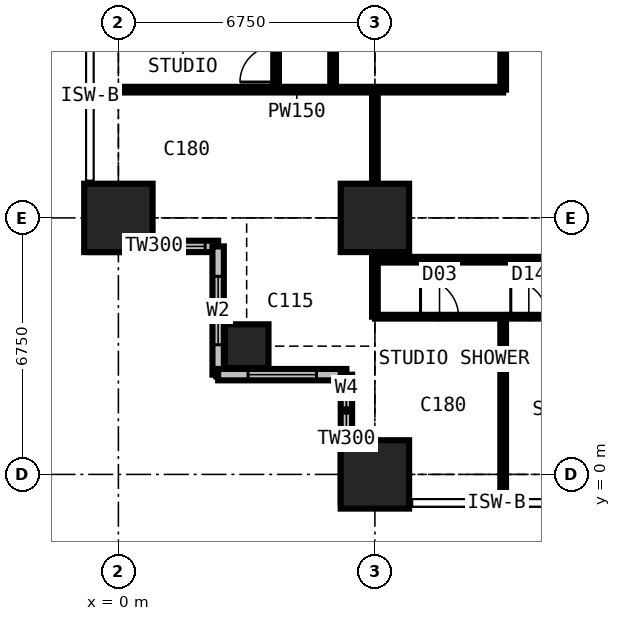
"""IFC4 building model, lengths in metres.
Left out: names, types, materials, properties, quantities, classifications, styles, units other than length and angle.
Written with IfcOpenShell. Run it as: python <this file> out.ifc"""

import sys

from ifc_helpers import new_model, si_unit, direction, frame, frame_2d, origin, origin_2d, place, context, subcontext, project, spatial, rectangle, extrude, element, fill, save


model = new_model("IFC4")
c1 = context("Model", 3, precision=1e-05, world=origin(), true_north=direction((0.0, 1.0)))
c2 = subcontext(c1, "Body", "Model", "MODEL_VIEW")
j1 = project(units=[si_unit("LENGTHUNIT", "METRE"), si_unit("PLANEANGLEUNIT", "RADIAN")], contexts=[c1])
p1 = place(None, origin())
s1 = spatial("IfcSite", under=j1, at=p1, CompositionType="ELEMENT")
p2 = place(p1, origin())
s2 = spatial("IfcBuilding", under=s1, at=p2, CompositionType="ELEMENT")
p3 = place(p2, frame((0.0, 0.0, 80.1)))
s3 = spatial("IfcBuildingStorey", under=s2, at=p3, CompositionType="ELEMENT", Elevation=80.1)
p4 = place(p3, frame((0.0, 6.75, 0.0), z_axis=(0.0, 0.0, 1.0), x_axis=(1.0, 0.0, 0.0)))
e1 = element("IfcColumn", 1, at=p4, inside=s3, PredefinedType="COLUMN", context=c2, shape_type="SweptSolid", body=[
    extrude(rectangle(XDim=1.8, YDim=1.8, at=origin_2d()), origin(), (0.0, 0.0, 1.0), 3.6),
])
p5 = place(p3, frame((3.375, 3.375, 0.0), z_axis=(0.0, 0.0, 1.0), x_axis=(1.0, 0.0, 0.0)))
e2 = element("IfcColumn", 2, at=p5, inside=s3, PredefinedType="COLUMN", context=c2, shape_type="SweptSolid", body=[
    extrude(rectangle(XDim=1.15, YDim=1.15, at=origin_2d()), origin(), (0.0, 0.0, 1.0), 3.6),
])
for number, where, z_axis, x_axis in (
    (3, (6.75, 0.0, 0.0), (0.0, 0.0, 1.0), (1.0, 0.0, 0.0)),
    (4, (6.75, 6.75, 0.0), (0.0, 0.0, 1.0), (1.0, 0.0, 0.0)),
):
    element("IfcColumn", number, at=place(p3, frame(where, z_axis=z_axis, x_axis=x_axis)), inside=s3, PredefinedType="COLUMN", context=c2, shape_type="SweptSolid", body=[
        extrude(rectangle(XDim=1.8, YDim=1.8, at=origin_2d()), origin(), (0.0, 0.0, 1.0), 3.6),
    ])
p6 = place(p3, frame((-0.75, 6.0, 0.0), z_axis=(0.0, 0.0, 1.0), x_axis=(1.0, 0.0, 0.0)))
e5 = element("IfcWall", 5, at=p6, inside=s3, PredefinedType="SOLIDWALL", context=c2, shape_type="SweptSolid", body=[
    extrude(rectangle(XDim=3.375, YDim=0.3, at=frame_2d((1.688, 0.0))), origin(), (0.0, 0.0, 1.0), 3.375),
])
p7 = place(p6, frame((1.833, 0.0, 0.9)))
e6 = element("IfcOpeningElement", 6, at=p7, cuts=e5, PredefinedType="OPENING", context=c2, shape_type="SweptSolid", body=[
    extrude(rectangle(XDim=1.2, YDim=1.8, at=frame_2d((0.6, 0.9))), frame((0.0, 0.16, 0.0), z_axis=(0.0, -1.0, 0.0), x_axis=(1.0, 0.0, 0.0)), (0.0, 0.0, 1.0), 0.32),
])
p8 = place(p3, frame((2.625, 6.0, 0.0), z_axis=(0.0, 0.0, 1.0), x_axis=(0.0, -1.0, 0.0)))
e7 = element("IfcWall", 7, at=p8, inside=s3, PredefinedType="SOLIDWALL", context=c2, shape_type="SweptSolid", body=[
    extrude(rectangle(XDim=3.375, YDim=0.3, at=frame_2d((1.688, 0.0))), origin(), (0.0, 0.0, 1.0), 3.375),
])
p9 = place(p8, frame((0.788, 0.0, 0.6)))
e8 = element("IfcOpeningElement", 8, at=p9, cuts=e7, PredefinedType="OPENING", context=c2, shape_type="SweptSolid", body=[
    extrude(rectangle(XDim=1.8, YDim=2.1, at=frame_2d((0.9, 1.05))), frame((0.0, 0.16, 0.0), z_axis=(0.0, -1.0, 0.0), x_axis=(1.0, 0.0, 0.0)), (0.0, 0.0, 1.0), 0.32),
])
p10 = place(p3, frame((2.625, 2.625, 0.0), z_axis=(0.0, 0.0, 1.0), x_axis=(1.0, 0.0, 0.0)))
e9 = element("IfcWall", 9, at=p10, inside=s3, PredefinedType="SOLIDWALL", context=c2, shape_type="SweptSolid", body=[
    extrude(rectangle(XDim=3.375, YDim=0.3, at=frame_2d((1.688, 0.0))), origin(), (0.0, 0.0, 1.0), 3.375),
])
p11 = place(p10, frame((0.788, 0.0, 0.6)))
e10 = element("IfcOpeningElement", 10, at=p11, cuts=e9, PredefinedType="OPENING", context=c2, shape_type="SweptSolid", body=[
    extrude(rectangle(XDim=1.8, YDim=2.1, at=frame_2d((0.9, 1.05))), frame((0.0, 0.16, 0.0), z_axis=(0.0, -1.0, 0.0), x_axis=(1.0, 0.0, 0.0)), (0.0, 0.0, 1.0), 0.32),
])
p12 = place(p3, frame((6.0, 2.625, 0.0), z_axis=(0.0, 0.0, 1.0), x_axis=(0.0, -1.0, 0.0)))
e11 = element("IfcWall", 11, at=p12, inside=s3, PredefinedType="SOLIDWALL", context=c2, shape_type="SweptSolid", body=[
    extrude(rectangle(XDim=3.375, YDim=0.3, at=frame_2d((1.688, 0.0))), origin(), (0.0, 0.0, 1.0), 3.375),
])
p13 = place(p12, frame((0.343, 0.0, 0.9)))
e12 = element("IfcOpeningElement", 12, at=p13, cuts=e11, PredefinedType="OPENING", context=c2, shape_type="SweptSolid", body=[
    extrude(rectangle(XDim=1.2, YDim=1.8, at=frame_2d((0.6, 0.9))), frame((0.0, 0.16, 0.0), z_axis=(0.0, -1.0, 0.0), x_axis=(1.0, 0.0, 0.0)), (0.0, 0.0, 1.0), 0.32),
])
p14 = place(p3, frame((-0.734, 10.125, 0.0), z_axis=(0.0, 0.0, 1.0), x_axis=(1.0, 0.0, 0.0)))
e13 = element("IfcWall", 13, at=p14, inside=s3, PredefinedType="PARTITIONING", context=c2, shape_type="SweptSolid", body=[
    extrude(rectangle(XDim=10.859, YDim=0.15, at=frame_2d((5.429, 0.0))), origin(), (0.0, 0.0, 1.0), 3.375),
])
p15 = place(p3, frame((4.15, 10.125, 0.0), z_axis=(0.0, 0.0, 1.0), x_axis=(0.0, 1.0, 0.0)))
e14 = element("IfcWall", 14, at=p15, inside=s3, PredefinedType="PARTITIONING", context=c2, shape_type="SweptSolid", body=[
    extrude(rectangle(XDim=16.875, YDim=0.15, at=frame_2d((8.438, 0.0))), origin(), (0.0, 0.0, 1.0), 3.375),
])
p16 = place(p15, frame((7.575, 0.0, 0.0)))
e15 = element("IfcOpeningElement", 15, at=p16, cuts=e14, PredefinedType="OPENING", context=c2, shape_type="SweptSolid", body=[
    extrude(rectangle(XDim=0.95, YDim=2.2, at=frame_2d((0.475, 1.1))), frame((0.0, 0.085, 0.0), z_axis=(0.0, -1.0, 0.0), x_axis=(1.0, 0.0, 0.0)), (0.0, 0.0, 1.0), 0.17),
])
p17 = place(p15, frame((0.2, 0.0, 0.0)))
e16 = element("IfcOpeningElement", 16, at=p17, cuts=e14, PredefinedType="OPENING", context=c2, shape_type="SweptSolid", body=[
    extrude(rectangle(XDim=0.95, YDim=2.2, at=frame_2d((0.475, 1.1))), frame((0.0, 0.085, 0.0), z_axis=(0.0, -1.0, 0.0), x_axis=(1.0, 0.0, 0.0)), (0.0, 0.0, 1.0), 0.17),
])
p18 = place(p15, frame((10.375, 0.0, 0.0)))
e17 = element("IfcOpeningElement", 17, at=p18, cuts=e14, PredefinedType="OPENING", context=c2, shape_type="SweptSolid", body=[
    extrude(rectangle(XDim=0.95, YDim=2.2, at=frame_2d((0.475, 1.1))), frame((0.0, 0.085, 0.0), z_axis=(0.0, -1.0, 0.0), x_axis=(1.0, 0.0, 0.0)), (0.0, 0.0, 1.0), 0.17),
])
p19 = place(p3, frame((5.65, 10.125, 0.0), z_axis=(0.0, 0.0, 1.0), x_axis=(0.0, 1.0, 0.0)))
e18 = element("IfcWall", 18, at=p19, inside=s3, PredefinedType="PARTITIONING", context=c2, shape_type="SweptSolid", body=[
    extrude(rectangle(XDim=10.762, YDim=0.15, at=frame_2d((5.381, 0.0))), origin(), (0.0, 0.0, 1.0), 3.375),
])
p20 = place(p19, frame((4.9, 0.0, 0.0)))
e19 = element("IfcOpeningElement", 19, at=p20, cuts=e18, PredefinedType="OPENING", context=c2, shape_type="SweptSolid", body=[
    extrude(rectangle(XDim=0.95, YDim=2.2, at=frame_2d((0.475, 1.1))), frame((0.0, 0.085, 0.0), z_axis=(0.0, -1.0, 0.0), x_axis=(1.0, 0.0, 0.0)), (0.0, 0.0, 1.0), 0.17),
])
p21 = place(p3, frame((6.75, 4.15, 0.0), z_axis=(0.0, 0.0, 1.0), x_axis=(0.0, 1.0, 0.0)))
e20 = element("IfcWall", 20, at=p21, inside=s3, PredefinedType="PARTITIONING", context=c2, shape_type="SweptSolid", body=[
    extrude(rectangle(XDim=5.975, YDim=0.15, at=frame_2d((2.988, 0.0))), origin(), (0.0, 0.0, 1.0), 2.877),
])
p22 = place(p3, frame((6.75, 4.15, 0.0), z_axis=(0.0, 0.0, 1.0), x_axis=(1.0, 0.0, 0.0)))
e21 = element("IfcWall", 21, at=p22, inside=s3, PredefinedType="PARTITIONING", context=c2, shape_type="SweptSolid", body=[
    extrude(rectangle(XDim=23.625, YDim=0.1, at=frame_2d((11.812, 0.0))), origin(), (0.0, 0.0, 1.0), 3.375),
])
p23 = place(p22, frame((1.2, 0.0, 0.0)))
e22 = element("IfcOpeningElement", 22, at=p23, cuts=e21, PredefinedType="OPENING", context=c2, shape_type="SweptSolid", body=[
    extrude(rectangle(XDim=1.0, YDim=2.2, at=frame_2d((0.5, 1.1))), frame((0.0, 0.06, 0.0), z_axis=(0.0, -1.0, 0.0), x_axis=(1.0, 0.0, 0.0)), (0.0, 0.0, 1.0), 0.12),
])
p24 = place(p22, frame((15.1, 0.0, 0.0)))
e23 = element("IfcOpeningElement", 23, at=p24, cuts=e21, PredefinedType="OPENING", context=c2, shape_type="SweptSolid", body=[
    extrude(rectangle(XDim=0.95, YDim=2.2, at=frame_2d((0.475, 1.1))), frame((0.0, 0.06, 0.0), z_axis=(0.0, -1.0, 0.0), x_axis=(1.0, 0.0, 0.0)), (0.0, 0.0, 1.0), 0.12),
])
p25 = place(p22, frame((8.35, 0.0, 0.0)))
e24 = element("IfcOpeningElement", 24, at=p25, cuts=e21, PredefinedType="OPENING", context=c2, shape_type="SweptSolid", body=[
    extrude(rectangle(XDim=0.95, YDim=2.2, at=frame_2d((0.475, 1.1))), frame((0.0, 0.06, 0.0), z_axis=(0.0, -1.0, 0.0), x_axis=(1.0, 0.0, 0.0)), (0.0, 0.0, 1.0), 0.12),
])
p26 = place(p22, frame((3.575, 0.0, 0.0)))
e25 = element("IfcOpeningElement", 25, at=p26, cuts=e21, PredefinedType="OPENING", context=c2, shape_type="SweptSolid", body=[
    extrude(rectangle(XDim=0.95, YDim=2.2, at=frame_2d((0.475, 1.1))), frame((0.0, 0.06, 0.0), z_axis=(0.0, -1.0, 0.0), x_axis=(1.0, 0.0, 0.0)), (0.0, 0.0, 1.0), 0.12),
])
p27 = place(p22, frame((20.5, 0.0, 0.0)))
e26 = element("IfcOpeningElement", 26, at=p27, cuts=e21, PredefinedType="OPENING", context=c2, shape_type="SweptSolid", body=[
    extrude(rectangle(XDim=0.95, YDim=2.2, at=frame_2d((0.475, 1.1))), frame((0.0, 0.06, 0.0), z_axis=(0.0, -1.0, 0.0), x_axis=(1.0, 0.0, 0.0)), (0.0, 0.0, 1.0), 0.12),
])
p28 = place(p3, frame((6.75, 5.65, 0.0), z_axis=(0.0, 0.0, 1.0), x_axis=(1.0, 0.0, 0.0)))
e27 = element("IfcWall", 27, at=p28, inside=s3, PredefinedType="PARTITIONING", context=c2, shape_type="SweptSolid", body=[
    extrude(rectangle(XDim=14.137, YDim=0.15, at=frame_2d((7.069, 0.0))), origin(), (0.0, 0.0, 1.0), 3.375),
])
p29 = place(p28, frame((7.85, 0.0, 0.0)))
e28 = element("IfcOpeningElement", 28, at=p29, cuts=e27, PredefinedType="OPENING", context=c2, shape_type="SweptSolid", body=[
    extrude(rectangle(XDim=0.95, YDim=2.2, at=frame_2d((0.475, 1.1))), frame((0.0, 0.085, 0.0), z_axis=(0.0, -1.0, 0.0), x_axis=(1.0, 0.0, 0.0)), (0.0, 0.0, 1.0), 0.17),
])
p30 = place(p3, frame((10.125, -0.734, 0.0), z_axis=(0.0, 0.0, 1.0), x_axis=(0.0, 1.0, 0.0)))
e29 = element("IfcWall", 29, at=p30, inside=s3, PredefinedType="PARTITIONING", context=c2, shape_type="SweptSolid", body=[
    extrude(rectangle(XDim=4.884, YDim=0.15, at=frame_2d((2.442, 0.0))), origin(), (0.0, 0.0, 1.0), 3.375),
])
p31 = place(p3, frame((10.125, 10.125, 0.0), z_axis=(0.0, 0.0, 1.0), x_axis=(0.0, 1.0, 0.0)))
e30 = element("IfcWall", 30, at=p31, inside=s3, PredefinedType="PARTITIONING", context=c2, shape_type="SweptSolid", body=[
    extrude(rectangle(XDim=1.175, YDim=0.15, at=frame_2d((0.587, 0.0))), origin(), (0.0, 0.0, 1.0), 3.375),
])
p32 = place(p7, origin())
e31 = element("IfcWindow", 31, at=p32, inside=s3, PartitioningType="SINGLE_PANEL", PredefinedType="WINDOW", context=c2, shape_type="SweptSolid", body=[
    extrude(rectangle(XDim=1.2, YDim=1.8, at=frame_2d((0.6, 0.9))), frame((0.0, 0.03, 0.0), z_axis=(0.0, -1.0, 0.0), x_axis=(1.0, 0.0, 0.0)), (0.0, 0.0, 1.0), 0.06),
])
fill(e6, e31)
p33 = place(p9, origin())
e32 = element("IfcWindow", 32, at=p33, inside=s3, PartitioningType="SINGLE_PANEL", PredefinedType="WINDOW", context=c2, shape_type="SweptSolid", body=[
    extrude(rectangle(XDim=1.8, YDim=2.1, at=frame_2d((0.9, 1.05))), frame((0.0, 0.03, 0.0), z_axis=(0.0, -1.0, 0.0), x_axis=(1.0, 0.0, 0.0)), (0.0, 0.0, 1.0), 0.06),
])
fill(e8, e32)
p34 = place(p11, origin())
e33 = element("IfcWindow", 33, at=p34, inside=s3, PartitioningType="SINGLE_PANEL", PredefinedType="WINDOW", context=c2, shape_type="SweptSolid", body=[
    extrude(rectangle(XDim=1.8, YDim=2.1, at=frame_2d((0.9, 1.05))), frame((0.0, 0.03, 0.0), z_axis=(0.0, -1.0, 0.0), x_axis=(1.0, 0.0, 0.0)), (0.0, 0.0, 1.0), 0.06),
])
fill(e10, e33)
p35 = place(p13, origin())
e34 = element("IfcWindow", 34, at=p35, inside=s3, PartitioningType="SINGLE_PANEL", PredefinedType="WINDOW", context=c2, shape_type="SweptSolid", body=[
    extrude(rectangle(XDim=1.2, YDim=1.8, at=frame_2d((0.6, 0.9))), frame((0.0, 0.03, 0.0), z_axis=(0.0, -1.0, 0.0), x_axis=(1.0, 0.0, 0.0)), (0.0, 0.0, 1.0), 0.06),
])
fill(e12, e34)
p36 = place(p23, origin())
e35 = element("IfcDoor", 35, at=p36, inside=s3, OperationType="SINGLE_SWING_LEFT", PredefinedType="DOOR", context=c2, shape_type="SweptSolid", body=[
    extrude(rectangle(XDim=1.0, YDim=2.2, at=frame_2d((0.5, 1.1))), frame((0.0, 0.025, 0.0), z_axis=(0.0, -1.0, 0.0), x_axis=(1.0, 0.0, 0.0)), (0.0, 0.0, 1.0), 0.05),
])
fill(e22, e35)
p37 = place(p26, origin())
e36 = element("IfcDoor", 36, at=p37, inside=s3, OperationType="SINGLE_SWING_LEFT", PredefinedType="DOOR", context=c2, shape_type="SweptSolid", body=[
    extrude(rectangle(XDim=0.95, YDim=2.2, at=frame_2d((0.475, 1.1))), frame((0.0, 0.025, 0.0), z_axis=(0.0, -1.0, 0.0), x_axis=(1.0, 0.0, 0.0)), (0.0, 0.0, 1.0), 0.05),
])
fill(e25, e36)
p38 = place(p17, origin())
e37 = element("IfcDoor", 37, at=p38, inside=s3, OperationType="SINGLE_SWING_LEFT", PredefinedType="DOOR", context=c2, shape_type="SweptSolid", body=[
    extrude(rectangle(XDim=0.95, YDim=2.2, at=frame_2d((0.475, 1.1))), frame((0.0, 0.025, 0.0), z_axis=(0.0, -1.0, 0.0), x_axis=(1.0, 0.0, 0.0)), (0.0, 0.0, 1.0), 0.05),
])
fill(e16, e37)
save(model, sys.argv[1])
